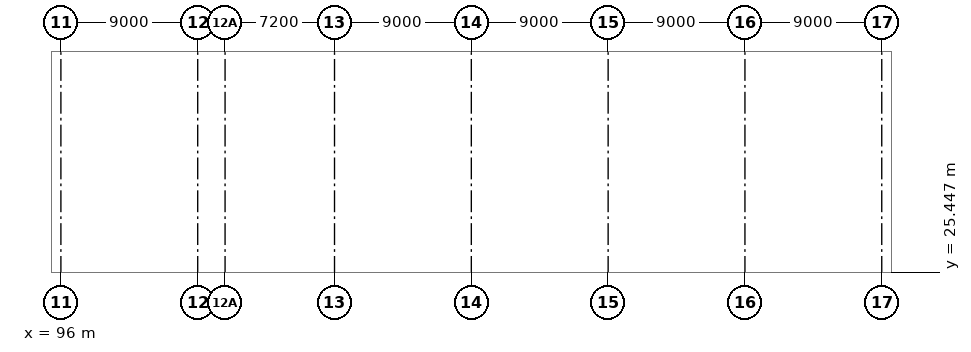
"""IFC4 building model, lengths in metres.
Left out: names, types, materials, properties, quantities, classifications, styles, units other than length and angle.
Written with IfcOpenShell. Run it as: python <this file> out.ifc"""

import sys

from ifc_helpers import new_model, si_unit, direction, frame, origin, origin_2d, place, context, subcontext, project, spatial, rectangle, extrude, element, save


model = new_model("IFC4")
c1 = context("Model", 3, precision=1e-05, world=origin(), true_north=direction((0.0, 1.0)))
c2 = subcontext(c1, "Body", "Model", "MODEL_VIEW")
j1 = project(units=[si_unit("LENGTHUNIT", "METRE"), si_unit("PLANEANGLEUNIT", "RADIAN")], contexts=[c1])
p1 = place(None, origin())
s1 = spatial("IfcSite", under=j1, at=p1, CompositionType="ELEMENT")
p2 = place(p1, origin())
s2 = spatial("IfcBuilding", under=s1, at=p2, CompositionType="ELEMENT")
p3 = place(p2, origin())
s3 = spatial("IfcBuildingStorey", under=s2, at=p3, CompositionType="ELEMENT", Elevation=0.0)
p4 = place(p3, frame((96.0, 33.7, -0.3), z_axis=(0.0, 0.0, 1.0), x_axis=(1.0, 0.0, 0.0)))
e1 = element("IfcColumn", 1, at=p4, inside=s3, PredefinedType="COLUMN", context=c2, shape_type="SweptSolid", body=[
    extrude(rectangle(XDim=1.0, YDim=1.4, at=origin_2d()), origin(), (0.0, 0.0, 1.0), 5.3),
])
for number, where, z_axis, x_axis in (
    (2, (105.4, 33.7, -0.3), (0.0, 0.0, 1.0), (1.0, 0.0, 0.0)),
    (3, (106.4, 33.7, -0.3), (0.0, 0.0, 1.0), (1.0, 0.0, 0.0)),
):
    element("IfcColumn", number, at=place(p3, frame(where, z_axis=z_axis, x_axis=x_axis)), inside=s3, PredefinedType="COLUMN", context=c2, shape_type="SweptSolid", body=[
        extrude(rectangle(XDim=0.8, YDim=1.2, at=origin_2d()), origin(), (0.0, 0.0, 1.0), 5.3),
    ])
for number, where, z_axis, x_axis in (
    (4, (114.0, 33.7, -0.3), (0.0, 0.0, 1.0), (1.0, 0.0, 0.0)),
    (5, (123.0, 33.7, -0.3), (0.0, 0.0, 1.0), (1.0, 0.0, 0.0)),
    (6, (132.0, 33.7, -0.3), (0.0, 0.0, 1.0), (1.0, 0.0, 0.0)),
    (7, (141.0, 33.7, -0.3), (0.0, 0.0, 1.0), (1.0, 0.0, 0.0)),
    (8, (150.0, 33.7, -0.3), (0.0, 0.0, 1.0), (1.0, 0.0, 0.0)),
):
    element("IfcColumn", number, at=place(p3, frame(where, z_axis=z_axis, x_axis=x_axis)), inside=s3, PredefinedType="COLUMN", context=c2, shape_type="SweptSolid", body=[
        extrude(rectangle(XDim=1.0, YDim=1.4, at=origin_2d()), origin(), (0.0, 0.0, 1.0), 5.3),
    ])
save(model, sys.argv[1])
